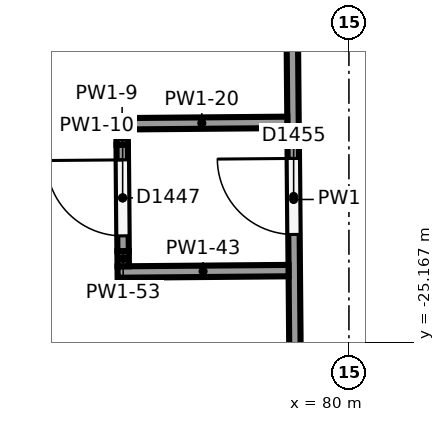
"""IFC4 building model, lengths in metres.
Left out: names, types, materials, properties, quantities, classifications, styles, units other than length and angle.
Written with IfcOpenShell. Run it as: python <this file> out.ifc"""

import sys

from ifc_helpers import new_model, si_unit, direction, frame, frame_2d, origin, place, context, subcontext, project, spatial, rectangle, extrude, element, fill, save


model = new_model("IFC4")
c1 = context("Model", 3, precision=1e-05, world=origin(), true_north=direction((0.0, 1.0)))
c2 = subcontext(c1, "Body", "Model", "MODEL_VIEW")
j1 = project(units=[si_unit("LENGTHUNIT", "METRE"), si_unit("PLANEANGLEUNIT", "RADIAN")], contexts=[c1])
p1 = place(None, origin())
s1 = spatial("IfcSite", under=j1, at=p1, CompositionType="ELEMENT")
p2 = place(p1, origin())
s2 = spatial("IfcBuilding", under=s1, at=p2, CompositionType="ELEMENT")
p3 = place(p2, frame((0.0, 0.0, 18.0)))
s3 = spatial("IfcBuildingStorey", under=s2, at=p3, CompositionType="ELEMENT", Elevation=18.0)
p4 = place(p3, frame((79.312, -27.947, 0.0), z_axis=(0.0, 0.0, 1.0), x_axis=(-0.008486924198, 0.99996398541, 0.0)))
e1 = element("IfcWall", 1, at=p4, inside=s3, PredefinedType="PARTITIONING", context=c2, shape_type="SweptSolid", body=[
    extrude(rectangle(XDim=9.32, YDim=0.15, at=frame_2d((4.66, 0.0))), origin(), (0.0, 0.0, 1.0), 5.6),
])
p5 = place(p4, frame((4.2, 0.0, 0.0)))
e2 = element("IfcOpeningElement", 2, at=p5, cuts=e1, PredefinedType="OPENING", context=c2, shape_type="SweptSolid", body=[
    extrude(rectangle(XDim=1.0, YDim=2.1, at=frame_2d((0.5, 1.05))), frame((0.0, 0.085, 0.0), z_axis=(0.0, -1.0, 0.0), x_axis=(1.0, 0.0, 0.0)), (0.0, 0.0, 1.0), 0.17),
])
p6 = place(p3, frame((79.206, -24.223, 0.0), z_axis=(0.0, 0.0, 1.0), x_axis=(-0.999965098525, -0.008354743119, 0.0)))
e3 = element("IfcWall", 3, at=p6, inside=s3, PredefinedType="PARTITIONING", context=c2, shape_type="SweptSolid", body=[
    extrude(rectangle(XDim=2.25, YDim=0.15, at=frame_2d((1.125, 0.0))), origin(), (0.0, 0.0, 1.0), 5.699),
])
p7 = place(p3, frame((79.189, -22.273, 0.0), z_axis=(0.0, 0.0, 1.0), x_axis=(-0.999963262016, -0.008571733691, 0.0)))
e4 = element("IfcWall", 4, at=p7, inside=s3, PredefinedType="PARTITIONING", context=c2, shape_type="SweptSolid", body=[
    extrude(rectangle(XDim=2.25, YDim=0.15, at=frame_2d((1.125, 0.0))), origin(), (0.0, 0.0, 1.0), 5.635),
])
p8 = place(p3, frame((77.03, -24.166, 0.0), z_axis=(0.0, 0.0, 1.0), x_axis=(-0.008546696379, 0.999963476324, 0.0)))
e5 = element("IfcWall", 5, at=p8, inside=s3, PredefinedType="PARTITIONING", context=c2, shape_type="SweptSolid", body=[
    extrude(rectangle(XDim=0.2, YDim=0.15, at=frame_2d((0.1, 0.0))), origin(), (0.0, 0.0, 1.0), 5.731),
])
p9 = place(p3, frame((77.029, -23.966, 0.0), z_axis=(0.0, 0.0, 1.0), x_axis=(-0.008369366846, 0.999964976236, 0.0)))
e6 = element("IfcWall", 6, at=p9, inside=s3, PredefinedType="PARTITIONING", context=c2, shape_type="SweptSolid", body=[
    extrude(rectangle(XDim=1.4, YDim=0.15, at=frame_2d((0.7, 0.0))), origin(), (0.0, 0.0, 1.0), 5.691),
])
p10 = place(p9, frame((0.2, 0.0, 0.0)))
e7 = element("IfcOpeningElement", 7, at=p10, cuts=e6, PredefinedType="OPENING", context=c2, shape_type="SweptSolid", body=[
    extrude(rectangle(XDim=1.0, YDim=2.1, at=frame_2d((0.5, 1.05))), frame((0.0, 0.085, 0.0), z_axis=(0.0, -1.0, 0.0), x_axis=(1.0, 0.0, 0.0)), (0.0, 0.0, 1.0), 0.17),
])
p11 = place(p3, frame((77.017, -22.566, 0.0), z_axis=(0.0, 0.0, 1.0), x_axis=(-0.008546696379, 0.999963476324, 0.0)))
e8 = element("IfcWall", 8, at=p11, inside=s3, PredefinedType="PARTITIONING", context=c2, shape_type="SweptSolid", body=[
    extrude(rectangle(XDim=0.2, YDim=0.15, at=frame_2d((0.1, 0.0))), origin(), (0.0, 0.0, 1.0), 5.685),
])
p12 = place(p5, origin())
e9 = element("IfcDoor", 9, at=p12, inside=s3, OperationType="SINGLE_SWING_RIGHT", PredefinedType="DOOR", context=c2, shape_type="SweptSolid", body=[
    extrude(rectangle(XDim=1.0, YDim=2.1, at=frame_2d((0.5, 1.05))), frame((0.0, 0.025, 0.0), z_axis=(0.0, -1.0, 0.0), x_axis=(1.0, 0.0, 0.0)), (0.0, 0.0, 1.0), 0.05),
])
fill(e2, e9)
p13 = place(p10, origin())
e10 = element("IfcDoor", 10, at=p13, inside=s3, OperationType="SINGLE_SWING_RIGHT", PredefinedType="DOOR", context=c2, shape_type="SweptSolid", body=[
    extrude(rectangle(XDim=1.0, YDim=2.1, at=frame_2d((0.5, 1.05))), frame((0.0, 0.025, 0.0), z_axis=(0.0, -1.0, 0.0), x_axis=(1.0, 0.0, 0.0)), (0.0, 0.0, 1.0), 0.05),
])
fill(e7, e10)
save(model, sys.argv[1])
